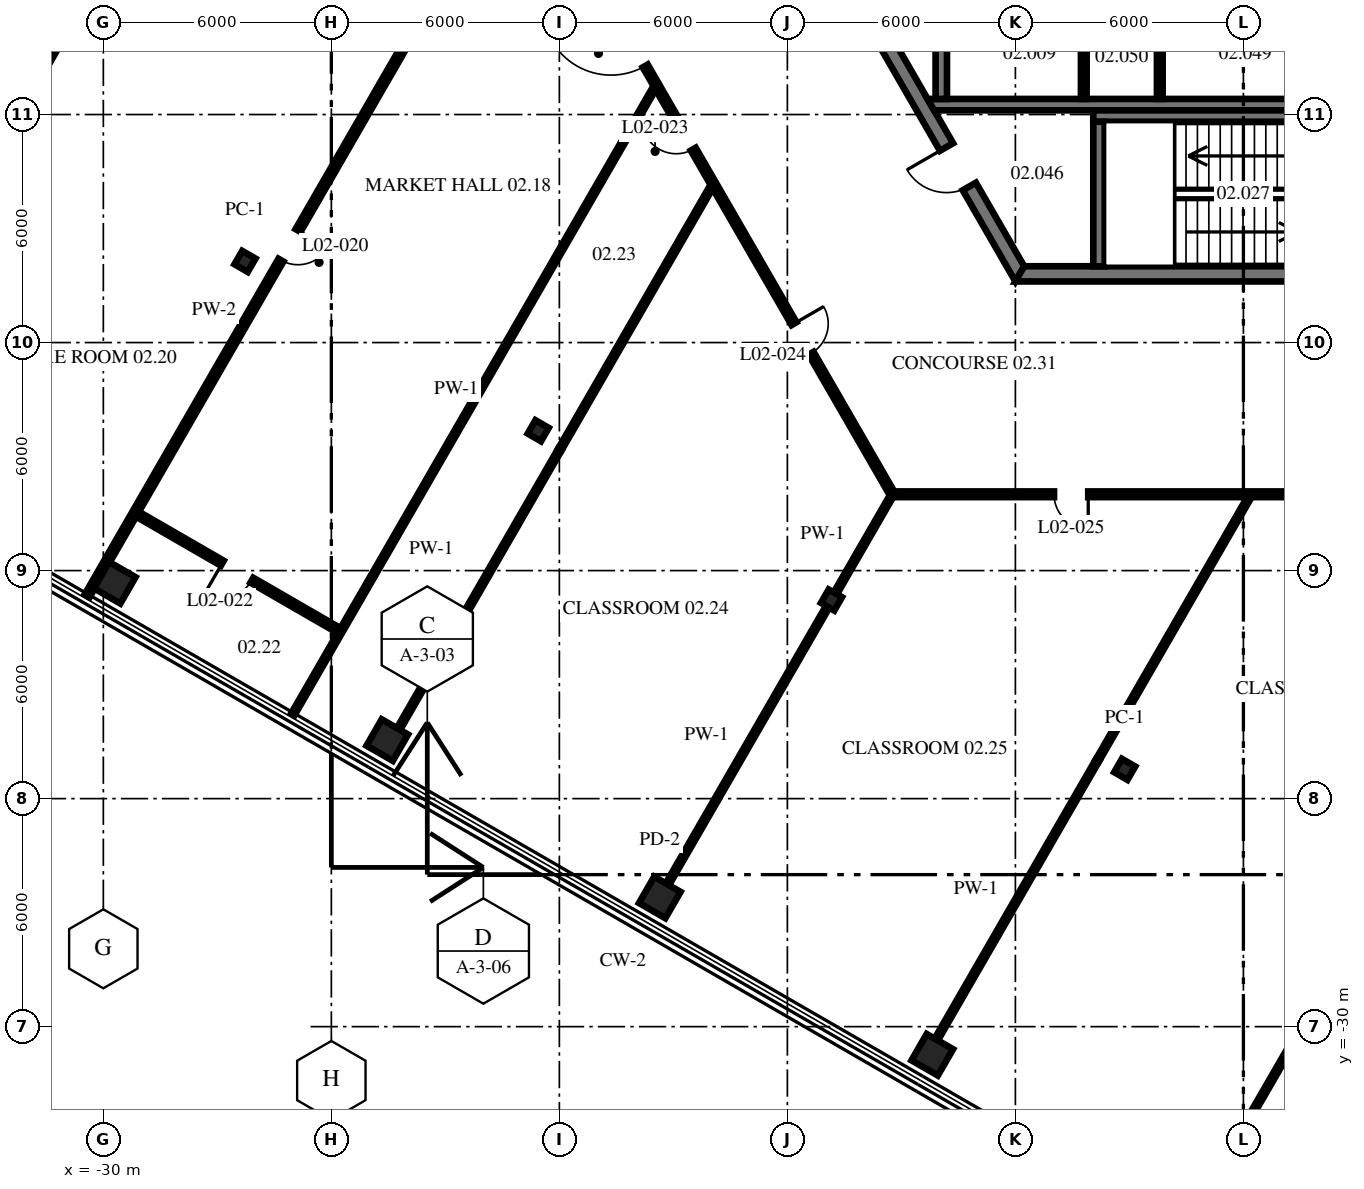
"""IFC4 building model, lengths in metres.
Left out: names, types, materials, properties, quantities, classifications, styles, units other than length and angle.
Written with IfcOpenShell. Run it as: python <this file> out.ifc"""

import sys

from ifc_helpers import new_model, si_unit, direction, frame, frame_2d, origin, origin_2d, place, context, subcontext, project, spatial, polyline, rectangle, i_section, outline, extrude, source, transform, mapped, element, fill, save


model = new_model("IFC4")
c1 = context("Model", 3, precision=1e-05, world=origin(), true_north=direction((0.0, 1.0)))
c2 = subcontext(c1, "Body", "Model", "MODEL_VIEW")
j1 = project(units=[si_unit("LENGTHUNIT", "METRE"), si_unit("PLANEANGLEUNIT", "RADIAN")], contexts=[c1])
p1 = place(None, origin())
s1 = spatial("IfcSite", under=j1, at=p1, CompositionType="ELEMENT")
p2 = place(p1, origin())
s2 = spatial("IfcBuilding", under=s1, at=p2, CompositionType="ELEMENT")
p3 = place(p2, frame((0.0, 0.0, 11.5)))
s3 = spatial("IfcBuildingStorey", under=s2, at=p3, CompositionType="ELEMENT", Elevation=11.5)
m1 = source(origin(), c2, "Body", "SweptSolid", [
    extrude(i_section(OverallWidth=0.404, OverallDepth=0.406, WebThickness=0.027, FlangeThickness=0.044, at=origin_2d()), origin(), (0.0, 0.0, 1.0), 4.5),
])
for number, where, z_axis, x_axis in (
    (1, (-26.272, -9.865, 0.0), (0.0, 0.0, 1.0), (0.866, -0.5, 0.0)),
    (2, (-18.556, -14.32, 0.0), (0.0, 0.0, 1.0), (0.866, -0.5, 0.0)),
    (3, (-10.84, -18.775, 0.0), (0.0, 0.0, 1.0), (0.866, -0.5, 0.0)),
    (4, (-3.124, -23.23, 0.0), (0.0, 0.0, 1.0), (0.866, -0.5, 0.0)),
):
    element("IfcColumn", number, at=place(p3, frame(where, z_axis=z_axis, x_axis=x_axis)), inside=s3, PredefinedType="COLUMN", context=c2, shape_type="MappedRepresentation", body=[
        mapped(m1, transform((0.0, 0.0, 0.0), scale=1.0)),
    ])
m2 = source(origin(), c2, "Body", "SweptSolid", [
    extrude(rectangle(XDim=0.8, YDim=0.8, at=origin_2d()), origin(), (0.0, 0.0, 1.0), 4.5),
])
for number, where, z_axis, x_axis in (
    (5, (-29.699, -18.32, 0.0), (0.0, 0.0, 1.0), (0.866, -0.5, 0.0)),
    (6, (-22.528, -22.46, 0.0), (0.0, 0.0, 1.0), (0.866, -0.5, 0.0)),
    (7, (-15.358, -26.6, 0.0), (0.0, 0.0, 1.0), (0.866, -0.5, 0.0)),
    (8, (-8.187, -30.74, 0.0), (0.0, 0.0, 1.0), (0.866, -0.5, 0.0)),
):
    element("IfcColumn", number, at=place(p3, frame(where, z_axis=z_axis, x_axis=x_axis)), inside=s3, PredefinedType="COLUMN", context=c2, shape_type="MappedRepresentation", body=[
        mapped(m2, transform((0.0, 0.0, 0.0), scale=1.0)),
    ])
m3 = source(origin(), c2, "Body", "SweptSolid", [
    extrude(outline(polyline([(-0.115, -0.2), (11.885, -0.2), (11.654, 0.2), (0.115, 0.2), (-0.115, -0.2)])), origin(), (0.0, 0.0, 1.0), 4.3),
])
p4 = place(p3, frame((-11.769, 0.0, 0.0), z_axis=(0.0, 0.0, 1.0), x_axis=(0.499996592174, -0.866027371285, 0.0)))
e9 = element("IfcWall", 9, at=p4, inside=s3, PredefinedType="SHEAR", context=c2, shape_type="MappedRepresentation", body=[
    mapped(m3, transform((0.0, 0.0, 0.0), scale=1.0)),
])
p5 = place(p4, frame((1.405, 0.0, 0.0)))
e10 = element("IfcOpeningElement", 10, at=p5, cuts=e9, PredefinedType="OPENING", context=c2, shape_type="SweptSolid", body=[
    extrude(rectangle(XDim=1.8, YDim=2.1, at=frame_2d((0.9, 1.05))), frame((0.0, 0.21, 0.0), z_axis=(0.0, -1.0, 0.0), x_axis=(1.0, 0.0, 0.0)), (0.0, 0.0, 1.0), 0.42),
])
p6 = place(p4, frame((7.915, 0.0, 0.0)))
e11 = element("IfcOpeningElement", 11, at=p6, cuts=e9, PredefinedType="OPENING", context=c2, shape_type="SweptSolid", body=[
    extrude(rectangle(XDim=1.2, YDim=2.1, at=frame_2d((0.6, 1.05))), frame((0.0, 0.21, 0.0), z_axis=(0.0, -1.0, 0.0), x_axis=(1.0, 0.0, 0.0)), (0.0, 0.0, 1.0), 0.42),
])
p7 = place(p3, frame((-5.885, -10.192, 0.0), z_axis=(0.0, 0.0, 1.0), x_axis=(1.0, 0.0, 0.0)))
e12 = element("IfcWall", 12, at=p7, inside=s3, PredefinedType="SHEAR", context=c2, shape_type="MappedRepresentation", body=[
    mapped(m3, transform((0.0, 0.0, 0.0), scale=1.0)),
])
p8 = place(p7, frame((7.985, 0.0, 0.0)))
e13 = element("IfcOpeningElement", 13, at=p8, cuts=e12, PredefinedType="OPENING", context=c2, shape_type="SweptSolid", body=[
    extrude(rectangle(XDim=1.2, YDim=2.1, at=frame_2d((0.6, 1.05))), frame((0.0, 0.21, 0.0), z_axis=(0.0, -1.0, 0.0), x_axis=(1.0, 0.0, 0.0)), (0.0, 0.0, 1.0), 0.42),
])
m4 = source(origin(), c2, "Body", "SweptSolid", [
    extrude(outline(polyline([(12.0, -0.15), (-0.04, -0.15), (-0.213, 0.15), (12.0, 0.15), (12.0, -0.15)])), origin(), (0.0, 0.0, 1.0), 4.3),
])
p9 = place(p3, frame((-8.1, -5.74, 0.0), z_axis=(0.0, 0.0, 1.0), x_axis=(1.0, 0.0, 0.0)))
e14 = element("IfcWall", 14, at=p9, inside=s3, PredefinedType="SHEAR", context=c2, shape_type="MappedRepresentation", body=[
    mapped(m4, transform((0.0, 0.0, 0.0), scale=1.0)),
])
m5 = source(origin(), c2, "Body", "SweptSolid", [
    extrude(rectangle(XDim=2.2, YDim=0.3, at=frame_2d((1.1, 0.0))), origin(), (0.0, 0.0, 1.0), 4.3),
])
p10 = place(p3, frame((-7.95, -5.59, 0.0), z_axis=(0.0, 0.0, 1.0), x_axis=(0.0, 1.0, 0.0)))
e15 = element("IfcWall", 15, at=p10, inside=s3, PredefinedType="SHEAR", context=c2, shape_type="MappedRepresentation", body=[
    mapped(m5, transform((0.0, 0.0, 0.0), scale=1.0)),
])
m6 = source(origin(), c2, "Body", "SweptSolid", [
    extrude(outline(polyline([(0.0, -0.15), (8.95, -0.15), (8.65, 0.15), (0.0, 0.15), (0.0, -0.15)])), origin(), (0.0, 0.0, 1.0), 4.3),
])
p11 = place(p3, frame((-3.95, -6.04, 0.0), z_axis=(0.0, 0.0, 1.0), x_axis=(1.0, 0.0, 0.0)))
e16 = element("IfcWall", 16, at=p11, inside=s3, PredefinedType="SHEAR", context=c2, shape_type="MappedRepresentation", body=[
    mapped(m6, transform((0.0, 0.0, 0.0), scale=1.0)),
])
m7 = source(origin(), c2, "Body", "SweptSolid", [
    extrude(outline(polyline([(3.8, -0.15), (-0.004, -0.15), (-0.004, 0.15), (3.8, 0.15), (3.8, -0.15)])), origin(), (0.0, 0.0, 1.0), 4.3),
])
p12 = place(p3, frame((-3.8, -9.99, 0.0), z_axis=(0.0, 0.0, 1.0), x_axis=(0.0, 1.0, 0.0)))
e17 = element("IfcWall", 17, at=p12, inside=s3, PredefinedType="SHEAR", context=c2, shape_type="MappedRepresentation", body=[
    mapped(m7, transform((0.0, 0.0, 0.0), scale=1.0)),
])
m8 = source(origin(), c2, "Body", "SweptSolid", [
    extrude(rectangle(XDim=2.2, YDim=0.15, at=frame_2d((1.1, 0.0))), origin(), (0.0, 0.0, 1.0), 4.3),
])
for number, where, z_axis, x_axis in (
    (18, (-4.2, -5.59, 0.0), (0.0, 0.0, 1.0), (0.0, 1.0, 0.0)),
    (19, (-2.2, -5.59, 0.0), (0.0, 0.0, 1.0), (0.0, 1.0, 0.0)),
):
    element("IfcWall", number, at=place(p3, frame(where, z_axis=z_axis, x_axis=x_axis)), inside=s3, PredefinedType="PARTITIONING", context=c2, shape_type="MappedRepresentation", body=[
        mapped(m8, transform((0.0, 0.0, 0.0), scale=1.0)),
    ])
p13 = place(p3, frame((-18.441, -0.043, 0.0), z_axis=(0.0, 0.0, 1.0), x_axis=(0.499994421829, -0.866028624319, 0.0)))
e20 = element("IfcWall", 20, at=p13, inside=s3, PredefinedType="PARTITIONING", context=c2, shape_type="SweptSolid", body=[
    extrude(rectangle(XDim=18.416, YDim=0.15, at=frame_2d((9.208, 0.0))), origin(), (0.0, 0.0, 1.0), 4.3),
])
p14 = place(p13, frame((3.602, 0.0, 0.0)))
e21 = element("IfcOpeningElement", 21, at=p14, cuts=e20, PredefinedType="OPENING", context=c2, shape_type="SweptSolid", body=[
    extrude(rectangle(XDim=1.8, YDim=2.4, at=frame_2d((0.9, 1.2))), frame((0.0, 0.085, 0.0), z_axis=(0.0, -1.0, 0.0), x_axis=(1.0, 0.0, 0.0)), (0.0, 0.0, 1.0), 0.17),
])
p15 = place(p13, frame((1.0, 0.0, 0.0)))
e22 = element("IfcOpeningElement", 22, at=p15, cuts=e20, PredefinedType="OPENING", context=c2, shape_type="SweptSolid", body=[
    extrude(rectangle(XDim=0.9, YDim=2.1, at=frame_2d((0.45, 1.05))), frame((0.0, 0.085, 0.0), z_axis=(0.0, -1.0, 0.0), x_axis=(1.0, 0.0, 0.0)), (0.0, 0.0, 1.0), 0.17),
])
p16 = place(p13, frame((7.031, 0.0, 0.0)))
e23 = element("IfcOpeningElement", 23, at=p16, cuts=e20, PredefinedType="OPENING", context=c2, shape_type="SweptSolid", body=[
    extrude(rectangle(XDim=0.9, YDim=2.1, at=frame_2d((0.45, 1.05))), frame((0.0, 0.085, 0.0), z_axis=(0.0, -1.0, 0.0), x_axis=(1.0, 0.0, 0.0)), (0.0, 0.0, 1.0), 0.17),
])
p17 = place(p13, frame((13.233, 0.0, 0.0)))
e24 = element("IfcOpeningElement", 24, at=p17, cuts=e20, PredefinedType="OPENING", context=c2, shape_type="SweptSolid", body=[
    extrude(rectangle(XDim=0.9, YDim=2.1, at=frame_2d((0.45, 1.05))), frame((0.0, 0.085, 0.0), z_axis=(0.0, -1.0, 0.0), x_axis=(1.0, 0.0, 0.0)), (0.0, 0.0, 1.0), 0.17),
])
p18 = place(p3, frame((-29.122, -16.504, 0.0), z_axis=(0.0, 0.0, 1.0), x_axis=(0.866022773512, -0.500004555738, 0.0)))
e25 = element("IfcWall", 25, at=p18, inside=s3, PredefinedType="PARTITIONING", context=c2, shape_type="SweptSolid", body=[
    extrude(rectangle(XDim=6.168, YDim=0.15, at=frame_2d((3.084, 0.0))), origin(), (0.0, 0.0, 1.0), 4.3),
])
p19 = place(p18, frame((2.6, 0.0, 0.0)))
e26 = element("IfcOpeningElement", 26, at=p19, cuts=e25, PredefinedType="OPENING", context=c2, shape_type="SweptSolid", body=[
    extrude(rectangle(XDim=0.9, YDim=2.1, at=frame_2d((0.45, 1.05))), frame((0.0, 0.085, 0.0), z_axis=(0.0, -1.0, 0.0), x_axis=(1.0, 0.0, 0.0)), (0.0, 0.0, 1.0), 0.17),
])
p20 = place(p3, frame((-9.193, -15.992, 0.0), z_axis=(0.0, 0.0, 1.0), x_axis=(1.0, 0.0, 0.0)))
e27 = element("IfcWall", 27, at=p20, inside=s3, PredefinedType="PARTITIONING", context=c2, shape_type="SweptSolid", body=[
    extrude(rectangle(XDim=18.385, YDim=0.15, at=frame_2d((9.192, 0.0))), origin(), (0.0, 0.0, 1.0), 4.3),
])
p21 = place(p20, frame((4.21, 0.0, 0.0)))
e28 = element("IfcOpeningElement", 28, at=p21, cuts=e27, PredefinedType="OPENING", context=c2, shape_type="SweptSolid", body=[
    extrude(rectangle(XDim=0.9, YDim=2.1, at=frame_2d((0.45, 1.05))), frame((0.0, 0.085, 0.0), z_axis=(0.0, -1.0, 0.0), x_axis=(1.0, 0.0, 0.0)), (0.0, 0.0, 1.0), 0.17),
])
p22 = place(p20, frame((13.444, 0.0, 0.0)))
e29 = element("IfcOpeningElement", 29, at=p22, cuts=e27, PredefinedType="OPENING", context=c2, shape_type="SweptSolid", body=[
    extrude(rectangle(XDim=0.9, YDim=2.1, at=frame_2d((0.45, 1.05))), frame((0.0, 0.085, 0.0), z_axis=(0.0, -1.0, 0.0), x_axis=(1.0, 0.0, 0.0)), (0.0, 0.0, 1.0), 0.17),
])
p23 = place(p3, frame((-1.012, -34.432, 0.0), z_axis=(0.0, 0.0, 1.0), x_axis=(0.500000180364, 0.866025299651, 0.0)))
e30 = element("IfcWall", 30, at=p23, inside=s3, PredefinedType="PARTITIONING", context=c2, shape_type="SweptSolid", body=[
    extrude(rectangle(XDim=19.15, YDim=0.1, at=frame_2d((9.575, 0.0))), origin(), (0.0, 0.0, 1.0), 4.3),
])
p24 = place(p23, frame((9.121, 0.0, 0.0)))
e31 = element("IfcOpeningElement", 31, at=p24, cuts=e30, PredefinedType="OPENING", context=c2, shape_type="SweptSolid", body=[
    extrude(rectangle(XDim=0.9, YDim=2.1, at=frame_2d((0.45, 1.05))), frame((0.0, 0.06, 0.0), z_axis=(0.0, -1.0, 0.0), x_axis=(1.0, 0.0, 0.0)), (0.0, 0.0, 1.0), 0.12),
])
m9 = source(origin(), c2, "Body", "SweptSolid", [
    extrude(rectangle(XDim=8.493, YDim=0.1, at=frame_2d((4.247, 0.0))), origin(), (0.0, 0.0, 1.0), 3.528),
])
p25 = place(p3, frame((-8.087, -30.347, 0.0), z_axis=(0.0, 0.0, 1.0), x_axis=(0.499991184371, 0.86603049343, 0.0)))
e32 = element("IfcWall", 32, at=p25, inside=s3, PredefinedType="PARTITIONING", context=c2, shape_type="MappedRepresentation", body=[
    mapped(m9, transform((0.0, 0.0, 0.0), scale=1.0)),
])
m10 = source(origin(), c2, "Body", "SweptSolid", [
    extrude(rectangle(XDim=7.992, YDim=0.1, at=frame_2d((3.996, 0.0))), origin(), (0.0, 0.0, 1.0), 4.3),
])
p26 = place(p3, frame((-3.841, -22.992, 0.0), z_axis=(0.0, 0.0, 1.0), x_axis=(0.500012428892, 0.866018227841, 0.0)))
e33 = element("IfcWall", 33, at=p26, inside=s3, PredefinedType="PARTITIONING", context=c2, shape_type="MappedRepresentation", body=[
    mapped(m10, transform((0.0, 0.0, 0.0), scale=1.0)),
])
p27 = place(p3, frame((-15.162, -26.263, 0.0), z_axis=(0.0, 0.0, 1.0), x_axis=(0.499984984754, 0.866034072667, 0.0)))
e34 = element("IfcWall", 34, at=p27, inside=s3, PredefinedType="PARTITIONING", context=c2, shape_type="SweptSolid", body=[
    extrude(rectangle(XDim=8.452, YDim=0.1, at=frame_2d((4.226, 0.0))), origin(), (0.0, 0.0, 1.0), 3.528),
])
p28 = place(p3, frame((-10.743, -18.608, 0.0), z_axis=(0.0, 0.0, 1.0), x_axis=(0.499989573202, 0.866031423615, 0.0)))
e35 = element("IfcWall", 35, at=p28, inside=s3, PredefinedType="PARTITIONING", context=c2, shape_type="SweptSolid", body=[
    extrude(rectangle(XDim=2.98, YDim=0.1, at=frame_2d((1.49, 0.0))), origin(), (0.0, 0.0, 1.0), 3.688),
])
m11 = source(origin(), c2, "Body", "SweptSolid", [
    extrude(rectangle(XDim=8.493, YDim=0.1, at=frame_2d((4.247, 0.0))), origin(), (0.0, 0.0, 1.0), 3.528),
])
p29 = place(p3, frame((-22.238, -22.177, 0.0), z_axis=(0.0, 0.0, 1.0), x_axis=(0.500003631449, 0.866023307156, 0.0)))
e36 = element("IfcWall", 36, at=p29, inside=s3, PredefinedType="PARTITIONING", context=c2, shape_type="MappedRepresentation", body=[
    mapped(m11, transform((0.0, 0.0, 0.0), scale=1.0)),
])
m12 = source(origin(), c2, "Body", "SweptSolid", [
    extrude(rectangle(XDim=7.993, YDim=0.1, at=frame_2d((3.996, 0.0))), origin(), (0.0, 0.0, 1.0), 4.3),
])
p30 = place(p3, frame((-17.991, -14.822, 0.0), z_axis=(0.0, 0.0, 1.0), x_axis=(0.499999202028, 0.866025864493, 0.0)))
e37 = element("IfcWall", 37, at=p30, inside=s3, PredefinedType="PARTITIONING", context=c2, shape_type="MappedRepresentation", body=[
    mapped(m12, transform((0.0, 0.0, 0.0), scale=1.0)),
])
p31 = place(p3, frame((-25.017, -21.79, 0.0), z_axis=(0.0, 0.0, 1.0), x_axis=(0.499998622058, 0.866026199338, 0.0)))
e38 = element("IfcWall", 38, at=p31, inside=s3, PredefinedType="PARTITIONING", context=c2, shape_type="SweptSolid", body=[
    extrude(rectangle(XDim=19.131, YDim=0.1, at=frame_2d((9.565, 0.0))), origin(), (0.0, 0.0, 1.0), 4.3),
])
p32 = place(p3, frame((-30.428, -18.666, 0.0), z_axis=(0.0, 0.0, 1.0), x_axis=(0.499997035717, 0.866027115207, 0.0)))
e39 = element("IfcWall", 39, at=p32, inside=s3, PredefinedType="PARTITIONING", context=c2, shape_type="SweptSolid", body=[
    extrude(rectangle(XDim=18.472, YDim=0.15, at=frame_2d((9.236, 0.0))), origin(), (0.0, 0.0, 1.0), 4.3),
])
p33 = place(p32, frame((10.202, 0.0, 0.0)))
e40 = element("IfcOpeningElement", 40, at=p33, cuts=e39, PredefinedType="OPENING", context=c2, shape_type="SweptSolid", body=[
    extrude(rectangle(XDim=0.9, YDim=2.1, at=frame_2d((0.45, 1.05))), frame((0.0, 0.085, 0.0), z_axis=(0.0, -1.0, 0.0), x_axis=(1.0, 0.0, 0.0)), (0.0, 0.0, 1.0), 0.17),
])
p34 = place(p3, frame((-32.506, -6.442, 0.0), z_axis=(0.0, 0.0, 1.0), x_axis=(0.500041894521, 0.86600121462, 0.0)))
e41 = element("IfcWall", 41, at=p34, inside=s3, PredefinedType="PARTITIONING", context=c2, shape_type="SweptSolid", body=[
    extrude(rectangle(XDim=4.366, YDim=0.1, at=frame_2d((2.183, 0.0))), origin(), (0.0, 0.0, 1.0), 4.3),
])
p35 = place(p6, frame((1.2, 0.0, 0.0), z_axis=(0.0, 0.0, 1.0), x_axis=(-1.0, 0.0, 0.0)))
e42 = element("IfcDoor", 42, at=p35, inside=s3, OperationType="SINGLE_SWING_RIGHT", PredefinedType="DOOR", context=c2, shape_type="SweptSolid", body=[
    extrude(rectangle(XDim=1.2, YDim=2.1, at=frame_2d((0.6, 1.05))), frame((0.0, 0.025, 0.0), z_axis=(0.0, -1.0, 0.0), x_axis=(1.0, 0.0, 0.0)), (0.0, 0.0, 1.0), 0.05),
])
fill(e11, e42)
p36 = place(p14, origin())
e43 = element("IfcDoor", 43, at=p36, inside=s3, OperationType="DOUBLE_DOOR_SINGLE_SWING", PredefinedType="DOOR", context=c2, shape_type="SweptSolid", body=[
    extrude(rectangle(XDim=1.8, YDim=2.4, at=frame_2d((0.9, 1.2))), frame((0.0, 0.025, 0.0), z_axis=(0.0, -1.0, 0.0), x_axis=(1.0, 0.0, 0.0)), (0.0, 0.0, 1.0), 0.05),
])
fill(e21, e43)
p37 = place(p33, origin())
e44 = element("IfcDoor", 44, at=p37, inside=s3, OperationType="SINGLE_SWING_RIGHT", PredefinedType="DOOR", context=c2, shape_type="SweptSolid", body=[
    extrude(rectangle(XDim=0.9, YDim=2.1, at=frame_2d((0.45, 1.05))), frame((0.0, 0.025, 0.0), z_axis=(0.0, -1.0, 0.0), x_axis=(1.0, 0.0, 0.0)), (0.0, 0.0, 1.0), 0.05),
])
fill(e40, e44)
p38 = place(p19, origin())
e45 = element("IfcDoor", 45, at=p38, inside=s3, OperationType="SINGLE_SWING_RIGHT", PredefinedType="DOOR", context=c2, shape_type="SweptSolid", body=[
    extrude(rectangle(XDim=0.9, YDim=2.1, at=frame_2d((0.45, 1.05))), frame((0.0, 0.025, 0.0), z_axis=(0.0, -1.0, 0.0), x_axis=(1.0, 0.0, 0.0)), (0.0, 0.0, 1.0), 0.05),
])
fill(e26, e45)
p39 = place(p16, origin())
e46 = element("IfcDoor", 46, at=p39, inside=s3, OperationType="SINGLE_SWING_RIGHT", PredefinedType="DOOR", context=c2, shape_type="SweptSolid", body=[
    extrude(rectangle(XDim=0.9, YDim=2.1, at=frame_2d((0.45, 1.05))), frame((0.0, 0.025, 0.0), z_axis=(0.0, -1.0, 0.0), x_axis=(1.0, 0.0, 0.0)), (0.0, 0.0, 1.0), 0.05),
])
fill(e23, e46)
p40 = place(p17, origin())
e47 = element("IfcDoor", 47, at=p40, inside=s3, OperationType="SINGLE_SWING_LEFT", PredefinedType="DOOR", context=c2, shape_type="SweptSolid", body=[
    extrude(rectangle(XDim=0.9, YDim=2.1, at=frame_2d((0.45, 1.05))), frame((0.0, 0.025, 0.0), z_axis=(0.0, -1.0, 0.0), x_axis=(1.0, 0.0, 0.0)), (0.0, 0.0, 1.0), 0.05),
])
fill(e24, e47)
p41 = place(p21, origin())
e48 = element("IfcDoor", 48, at=p41, inside=s3, OperationType="SINGLE_SWING_RIGHT", PredefinedType="DOOR", context=c2, shape_type="SweptSolid", body=[
    extrude(rectangle(XDim=0.9, YDim=2.1, at=frame_2d((0.45, 1.05))), frame((0.0, 0.025, 0.0), z_axis=(0.0, -1.0, 0.0), x_axis=(1.0, 0.0, 0.0)), (0.0, 0.0, 1.0), 0.05),
])
fill(e28, e48)
save(model, sys.argv[1])
